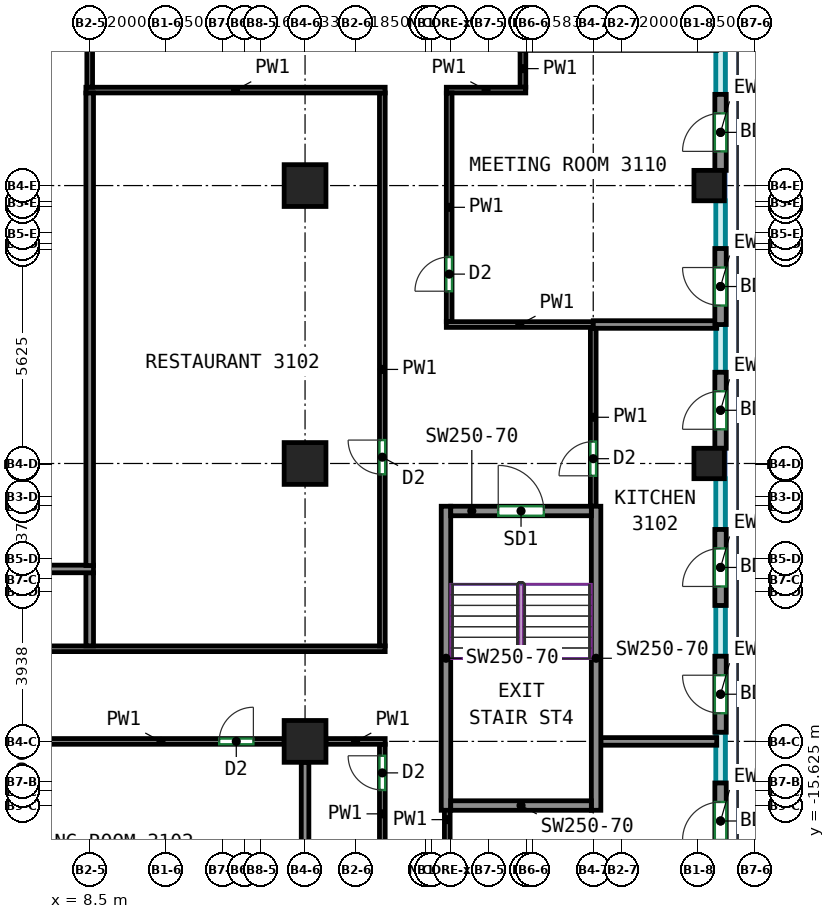
"""IFC4 building model, lengths in metres.
Left out: names, types, materials, properties, quantities, classifications, styles, units other than length and angle.
Written with IfcOpenShell. Run it as: python <this file> out.ifc"""

import sys

from ifc_helpers import new_model, si_unit, direction, frame, frame_2d, origin, origin_2d, place, context, subcontext, project, spatial, rectangle, extrude, source, transform, mapped, element, fill, save


model = new_model("IFC4")
c1 = context("Model", 3, precision=1e-05, world=origin(), true_north=direction((0.0, 1.0)))
c2 = subcontext(c1, "Body", "Model", "MODEL_VIEW")
j1 = project(units=[si_unit("LENGTHUNIT", "METRE"), si_unit("PLANEANGLEUNIT", "RADIAN")], contexts=[c1])
p1 = place(None, origin())
s1 = spatial("IfcSite", under=j1, at=p1, CompositionType="ELEMENT")
p2 = place(p1, origin())
s2 = spatial("IfcBuilding", under=s1, at=p2, CompositionType="ELEMENT")
p3 = place(p2, frame((0.0, 0.0, 138.5)))
s3 = spatial("IfcBuildingStorey", under=s2, at=p3, CompositionType="ELEMENT", Elevation=138.5)
m1 = source(origin(), c2, "Body", "SweptSolid", [
    extrude(rectangle(XDim=1.1, YDim=1.1, at=origin_2d()), origin(), (0.0, 0.0, 1.0), 5.12),
])
for number, where, z_axis, x_axis in (
    (1, (14.167, -13.938, 0.0), (0.0, 0.0, 1.0), (1.0, 0.0, 0.0)),
    (2, (14.167, -6.625, 0.0), (0.0, 0.0, 1.0), (1.0, 0.0, 0.0)),
    (3, (14.167, 0.688, 0.0), (0.0, 0.0, 1.0), (1.0, 0.0, 0.0)),
):
    element("IfcColumn", number, at=place(p3, frame(where, z_axis=z_axis, x_axis=x_axis)), inside=s3, PredefinedType="COLUMN", context=c2, shape_type="MappedRepresentation", body=[
        mapped(m1, transform((0.0, 0.0, 0.0))),
    ])
m2 = source(origin(), c2, "Body", "SweptSolid", [
    extrude(rectangle(XDim=0.8, YDim=0.8, at=origin_2d()), origin(), (0.0, 0.0, 1.0), 5.12),
])
for number, where, z_axis, x_axis in (
    (4, (24.8, -6.625, 0.0), (0.0, 0.0, 1.0), (1.0, 0.0, 0.0)),
    (5, (24.8, 0.688, 0.0), (0.0, 0.0, 1.0), (1.0, 0.0, 0.0)),
):
    element("IfcColumn", number, at=place(p3, frame(where, z_axis=z_axis, x_axis=x_axis)), inside=s3, PredefinedType="COLUMN", context=c2, shape_type="MappedRepresentation", body=[
        mapped(m2, transform((0.0, 0.0, 0.0))),
    ])
m3 = source(origin(), c2, "Body", "SweptSolid", [
    extrude(rectangle(XDim=8.0, YDim=0.25, at=frame_2d((4.0, 0.0))), origin(), (0.0, 0.0, 1.0), 5.12),
])
for number, where, z_axis, x_axis in (
    (6, (17.875, -15.75, 0.0), (0.0, 0.0, 1.0), (0.0, 1.0, 0.0)),
    (7, (21.825, -15.75, 0.0), (0.0, 0.0, 1.0), (0.0, 1.0, 0.0)),
):
    element("IfcWall", number, at=place(p3, frame(where, z_axis=z_axis, x_axis=x_axis)), inside=s3, PredefinedType="SHEAR", context=c2, shape_type="MappedRepresentation", body=[
        mapped(m3, transform((0.0, 0.0, 0.0))),
    ])
m4 = source(origin(), c2, "Body", "SweptSolid", [
    extrude(rectangle(XDim=3.7, YDim=0.25, at=frame_2d((1.85, 0.0))), origin(), (0.0, 0.0, 1.0), 5.12),
])
p4 = place(p3, frame((18.0, -15.625, 0.0), z_axis=(0.0, 0.0, 1.0), x_axis=(1.0, 0.0, 0.0)))
e8 = element("IfcWall", 8, at=p4, inside=s3, PredefinedType="SHEAR", context=c2, shape_type="MappedRepresentation", body=[
    mapped(m4, transform((0.0, 0.0, 0.0))),
])
p5 = place(p3, frame((18.0, -7.875, 0.0), z_axis=(0.0, 0.0, 1.0), x_axis=(1.0, 0.0, 0.0)))
e9 = element("IfcWall", 9, at=p5, inside=s3, PredefinedType="SHEAR", context=c2, shape_type="MappedRepresentation", body=[
    mapped(m4, transform((0.0, 0.0, 0.0))),
])
p6 = place(p5, frame((1.25, 0.0, 0.0)))
e10 = element("IfcOpeningElement", 10, at=p6, cuts=e9, PredefinedType="OPENING", context=c2, shape_type="SweptSolid", body=[
    extrude(rectangle(XDim=1.2, YDim=2.1, at=frame_2d((0.6, 1.05))), frame((0.0, 0.135, 0.0), z_axis=(0.0, -1.0, 0.0), x_axis=(1.0, 0.0, 0.0)), (0.0, 0.0, 1.0), 0.27),
])
m5 = source(origin(), c2, "Body", "SweptSolid", [
    extrude(rectangle(XDim=2.0, YDim=0.3, at=frame_2d((1.0, 0.0))), origin(), (0.0, 0.0, 1.0), 5.12),
])
p7 = place(p3, frame((25.1, -17.032, 0.0), z_axis=(0.0, 0.0, 1.0), x_axis=(0.0, 1.0, 0.0)))
e11 = element("IfcWall", 11, at=p7, inside=s3, PredefinedType="SOLIDWALL", context=c2, shape_type="MappedRepresentation", body=[
    mapped(m5, transform((0.0, 0.0, 0.0))),
])
p8 = place(p7, frame((0.5, 0.0, 0.0)))
e12 = element("IfcOpeningElement", 12, at=p8, cuts=e11, PredefinedType="OPENING", context=c2, shape_type="SweptSolid", body=[
    extrude(rectangle(XDim=1.0, YDim=2.1, at=frame_2d((0.5, 1.05))), frame((0.0, 0.16, 0.0), z_axis=(0.0, -1.0, 0.0), x_axis=(1.0, 0.0, 0.0)), (0.0, 0.0, 1.0), 0.32),
])
p9 = place(p3, frame((25.1, -13.696, 0.0), z_axis=(0.0, 0.0, 1.0), x_axis=(0.0, 1.0, 0.0)))
e13 = element("IfcWall", 13, at=p9, inside=s3, PredefinedType="SOLIDWALL", context=c2, shape_type="MappedRepresentation", body=[
    mapped(m5, transform((0.0, 0.0, 0.0))),
])
p10 = place(p9, frame((0.5, 0.0, 0.0)))
e14 = element("IfcOpeningElement", 14, at=p10, cuts=e13, PredefinedType="OPENING", context=c2, shape_type="SweptSolid", body=[
    extrude(rectangle(XDim=1.0, YDim=2.1, at=frame_2d((0.5, 1.05))), frame((0.0, 0.16, 0.0), z_axis=(0.0, -1.0, 0.0), x_axis=(1.0, 0.0, 0.0)), (0.0, 0.0, 1.0), 0.32),
])
p11 = place(p3, frame((25.1, -10.361, 0.0), z_axis=(0.0, 0.0, 1.0), x_axis=(0.0, 1.0, 0.0)))
e15 = element("IfcWall", 15, at=p11, inside=s3, PredefinedType="SOLIDWALL", context=c2, shape_type="MappedRepresentation", body=[
    mapped(m5, transform((0.0, 0.0, 0.0))),
])
p12 = place(p11, frame((0.5, 0.0, 0.0)))
e16 = element("IfcOpeningElement", 16, at=p12, cuts=e15, PredefinedType="OPENING", context=c2, shape_type="SweptSolid", body=[
    extrude(rectangle(XDim=1.0, YDim=2.1, at=frame_2d((0.5, 1.05))), frame((0.0, 0.16, 0.0), z_axis=(0.0, -1.0, 0.0), x_axis=(1.0, 0.0, 0.0)), (0.0, 0.0, 1.0), 0.32),
])
p13 = place(p3, frame((25.1, -6.225, 0.0), z_axis=(0.0, 0.0, 1.0), x_axis=(0.0, 1.0, 0.0)))
e17 = element("IfcWall", 17, at=p13, inside=s3, PredefinedType="SOLIDWALL", context=c2, shape_type="MappedRepresentation", body=[
    mapped(m5, transform((0.0, 0.0, 0.0))),
])
p14 = place(p13, frame((0.5, 0.0, 0.0)))
e18 = element("IfcOpeningElement", 18, at=p14, cuts=e17, PredefinedType="OPENING", context=c2, shape_type="SweptSolid", body=[
    extrude(rectangle(XDim=1.0, YDim=2.1, at=frame_2d((0.5, 1.05))), frame((0.0, 0.16, 0.0), z_axis=(0.0, -1.0, 0.0), x_axis=(1.0, 0.0, 0.0)), (0.0, 0.0, 1.0), 0.32),
])
p15 = place(p3, frame((25.1, -2.969, 0.0), z_axis=(0.0, 0.0, 1.0), x_axis=(0.0, 1.0, 0.0)))
e19 = element("IfcWall", 19, at=p15, inside=s3, PredefinedType="SOLIDWALL", context=c2, shape_type="MappedRepresentation", body=[
    mapped(m5, transform((0.0, 0.0, 0.0))),
])
p16 = place(p15, frame((0.5, 0.0, 0.0)))
e20 = element("IfcOpeningElement", 20, at=p16, cuts=e19, PredefinedType="OPENING", context=c2, shape_type="SweptSolid", body=[
    extrude(rectangle(XDim=1.0, YDim=2.1, at=frame_2d((0.5, 1.05))), frame((0.0, 0.16, 0.0), z_axis=(0.0, -1.0, 0.0), x_axis=(1.0, 0.0, 0.0)), (0.0, 0.0, 1.0), 0.32),
])
p17 = place(p3, frame((25.1, 1.087, 0.0), z_axis=(0.0, 0.0, 1.0), x_axis=(0.0, 1.0, 0.0)))
e21 = element("IfcWall", 21, at=p17, inside=s3, PredefinedType="SOLIDWALL", context=c2, shape_type="MappedRepresentation", body=[
    mapped(m5, transform((0.0, 0.0, 0.0))),
])
p18 = place(p17, frame((0.5, 0.0, 0.0)))
e22 = element("IfcOpeningElement", 22, at=p18, cuts=e21, PredefinedType="OPENING", context=c2, shape_type="SweptSolid", body=[
    extrude(rectangle(XDim=1.0, YDim=2.1, at=frame_2d((0.5, 1.05))), frame((0.0, 0.16, 0.0), z_axis=(0.0, -1.0, 0.0), x_axis=(1.0, 0.0, 0.0)), (0.0, 0.0, 1.0), 0.32),
])
p19 = place(p3, frame((7.133, -13.938, 0.0), z_axis=(0.0, 0.0, 1.0), x_axis=(1.0, 0.0, 0.0)))
e23 = element("IfcWall", 23, at=p19, inside=s3, PredefinedType="PARTITIONING", context=c2, shape_type="SweptSolid", body=[
    extrude(rectangle(XDim=6.484, YDim=0.15, at=frame_2d((3.242, 0.0))), origin(), (0.0, 0.0, 1.0), 5.12),
])
p20 = place(p19, frame((4.774, 0.0, 0.0)))
e24 = element("IfcOpeningElement", 24, at=p20, cuts=e23, PredefinedType="OPENING", context=c2, shape_type="SweptSolid", body=[
    extrude(rectangle(XDim=0.9, YDim=2.1, at=frame_2d((0.45, 1.05))), frame((0.0, 0.085, 0.0), z_axis=(0.0, -1.0, 0.0), x_axis=(1.0, 0.0, 0.0)), (0.0, 0.0, 1.0), 0.17),
])
p21 = place(p3, frame((16.2, -17.675, 0.0), z_axis=(0.0, 0.0, 1.0), x_axis=(0.0, 1.0, 0.0)))
e25 = element("IfcWall", 25, at=p21, inside=s3, PredefinedType="PARTITIONING", context=c2, shape_type="SweptSolid", body=[
    extrude(rectangle(XDim=3.662, YDim=0.15, at=frame_2d((1.831, 0.0))), origin(), (0.0, 0.0, 1.0), 5.12),
])
p22 = place(p21, frame((2.459, 0.0, 0.0)))
e26 = element("IfcOpeningElement", 26, at=p22, cuts=e25, PredefinedType="OPENING", context=c2, shape_type="SweptSolid", body=[
    extrude(rectangle(XDim=0.9, YDim=2.1, at=frame_2d((0.45, 1.05))), frame((0.0, 0.085, 0.0), z_axis=(0.0, -1.0, 0.0), x_axis=(1.0, 0.0, 0.0)), (0.0, 0.0, 1.0), 0.17),
])
p23 = place(p3, frame((14.717, -13.938, 0.0), z_axis=(0.0, 0.0, 1.0), x_axis=(1.0, 0.0, 0.0)))
e27 = element("IfcWall", 27, at=p23, inside=s3, PredefinedType="PARTITIONING", context=c2, shape_type="SweptSolid", body=[
    extrude(rectangle(XDim=1.558, YDim=0.15, at=frame_2d((0.779, 0.0))), origin(), (0.0, 0.0, 1.0), 5.12),
])
p24 = place(p3, frame((17.909, -17.675, 0.0), z_axis=(0.0, 0.0, 1.0), x_axis=(0.0, 1.0, 0.0)))
e28 = element("IfcWall", 28, at=p24, inside=s3, PredefinedType="PARTITIONING", context=c2, shape_type="SweptSolid", body=[
    extrude(rectangle(XDim=1.975, YDim=0.15, at=frame_2d((0.988, 0.0))), origin(), (0.0, 0.0, 1.0), 5.12),
])
p25 = place(p24, frame((0.2, 0.0, 0.0)))
e29 = element("IfcOpeningElement", 29, at=p25, cuts=e28, PredefinedType="OPENING", context=c2, shape_type="SweptSolid", body=[
    extrude(rectangle(XDim=0.9, YDim=2.1, at=frame_2d((0.45, 1.05))), frame((0.0, 0.085, 0.0), z_axis=(0.0, -1.0, 0.0), x_axis=(1.0, 0.0, 0.0)), (0.0, 0.0, 1.0), 0.17),
])
p26 = place(p3, frame((19.9, 3.275, 0.0), z_axis=(0.0, 0.0, 1.0), x_axis=(0.0, 1.0, 0.0)))
e30 = element("IfcWall", 30, at=p26, inside=s3, PredefinedType="PARTITIONING", context=c2, shape_type="SweptSolid", body=[
    extrude(rectangle(XDim=0.979, YDim=0.15, at=frame_2d((0.49, 0.0))), origin(), (0.0, 0.0, 1.0), 5.12),
])
p27 = place(p3, frame((17.884, 3.2, 0.0), z_axis=(0.0, 0.0, 1.0), x_axis=(1.0, 0.0, 0.0)))
e31 = element("IfcWall", 31, at=p27, inside=s3, PredefinedType="PARTITIONING", context=c2, shape_type="SweptSolid", body=[
    extrude(rectangle(XDim=2.091, YDim=0.15, at=frame_2d((1.045, 0.0))), origin(), (0.0, 0.0, 1.0), 5.12),
])
p28 = place(p3, frame((17.959, -2.894, 0.0), z_axis=(0.0, 0.0, 1.0), x_axis=(0.0, 1.0, 0.0)))
e32 = element("IfcWall", 32, at=p28, inside=s3, PredefinedType="PARTITIONING", context=c2, shape_type="SweptSolid", body=[
    extrude(rectangle(XDim=6.019, YDim=0.15, at=frame_2d((3.01, 0.0))), origin(), (0.0, 0.0, 1.0), 5.12),
])
p29 = place(p28, frame((0.802, 0.0, 0.0)))
e33 = element("IfcOpeningElement", 33, at=p29, cuts=e32, PredefinedType="OPENING", context=c2, shape_type="SweptSolid", body=[
    extrude(rectangle(XDim=0.9, YDim=2.1, at=frame_2d((0.45, 1.05))), frame((0.0, 0.085, 0.0), z_axis=(0.0, -1.0, 0.0), x_axis=(1.0, 0.0, 0.0)), (0.0, 0.0, 1.0), 0.17),
])
p30 = place(p3, frame((21.751, -2.969, 0.0), z_axis=(0.0, 0.0, 1.0), x_axis=(-1.0, 0.0, 0.0)))
e34 = element("IfcWall", 34, at=p30, inside=s3, PredefinedType="PARTITIONING", context=c2, shape_type="SweptSolid", body=[
    extrude(rectangle(XDim=3.867, YDim=0.15, at=frame_2d((1.934, 0.0))), origin(), (0.0, 0.0, 1.0), 5.12),
])
p31 = place(p3, frame((21.75, -7.75, 0.0), z_axis=(0.0, 0.0, 1.0), x_axis=(0.0, 1.0, 0.0)))
e35 = element("IfcWall", 35, at=p31, inside=s3, PredefinedType="PARTITIONING", context=c2, shape_type="SweptSolid", body=[
    extrude(rectangle(XDim=4.682, YDim=0.15, at=frame_2d((2.341, 0.0))), origin(), (0.0, 0.0, 1.0), 5.12),
])
p32 = place(p31, frame((0.801, 0.0, 0.0)))
e36 = element("IfcOpeningElement", 36, at=p32, cuts=e35, PredefinedType="OPENING", context=c2, shape_type="SweptSolid", body=[
    extrude(rectangle(XDim=0.9, YDim=2.1, at=frame_2d((0.45, 1.05))), frame((0.0, 0.085, 0.0), z_axis=(0.0, -1.0, 0.0), x_axis=(1.0, 0.0, 0.0)), (0.0, 0.0, 1.0), 0.17),
])
p33 = place(p3, frame((-12.075, -11.5, 0.0), z_axis=(0.0, 0.0, 1.0), x_axis=(1.0, 0.0, 0.0)))
e37 = element("IfcWall", 37, at=p33, inside=s3, PredefinedType="PARTITIONING", context=c2, shape_type="SweptSolid", body=[
    extrude(rectangle(XDim=28.35, YDim=0.15, at=frame_2d((14.175, 0.0))), origin(), (0.0, 0.0, 1.0), 5.12),
])
p34 = place(p33, frame((0.404, 0.0, 0.0)))
e38 = element("IfcOpeningElement", 38, at=p34, cuts=e37, PredefinedType="OPENING", context=c2, shape_type="SweptSolid", body=[
    extrude(rectangle(XDim=0.9, YDim=2.1, at=frame_2d((0.45, 1.05))), frame((0.0, 0.085, 0.0), z_axis=(0.0, -1.0, 0.0), x_axis=(1.0, 0.0, 0.0)), (0.0, 0.0, 1.0), 0.17),
])
p35 = place(p33, frame((13.176, 0.0, 0.0)))
e39 = element("IfcOpeningElement", 39, at=p35, cuts=e37, PredefinedType="OPENING", context=c2, shape_type="SweptSolid", body=[
    extrude(rectangle(XDim=1.0, YDim=2.1, at=frame_2d((0.5, 1.05))), frame((0.0, 0.085, 0.0), z_axis=(0.0, -1.0, 0.0), x_axis=(1.0, 0.0, 0.0)), (0.0, 0.0, 1.0), 0.17),
])
p36 = place(p3, frame((16.2, -11.425, 0.0), z_axis=(0.0, 0.0, 1.0), x_axis=(0.0, 1.0, 0.0)))
e40 = element("IfcWall", 40, at=p36, inside=s3, PredefinedType="PARTITIONING", context=c2, shape_type="SweptSolid", body=[
    extrude(rectangle(XDim=14.55, YDim=0.15, at=frame_2d((7.275, 0.0))), origin(), (0.0, 0.0, 1.0), 5.12),
])
p37 = place(p36, frame((4.516, 0.0, 0.0)))
e41 = element("IfcOpeningElement", 41, at=p37, cuts=e40, PredefinedType="OPENING", context=c2, shape_type="SweptSolid", body=[
    extrude(rectangle(XDim=0.9, YDim=2.1, at=frame_2d((0.45, 1.05))), frame((0.0, 0.085, 0.0), z_axis=(0.0, -1.0, 0.0), x_axis=(1.0, 0.0, 0.0)), (0.0, 0.0, 1.0), 0.17),
])
p38 = place(p3, frame((8.4, 3.2, 0.0), z_axis=(0.0, 0.0, 1.0), x_axis=(1.0, 0.0, 0.0)))
e42 = element("IfcWall", 42, at=p38, inside=s3, PredefinedType="PARTITIONING", context=c2, shape_type="SweptSolid", body=[
    extrude(rectangle(XDim=7.875, YDim=0.15, at=frame_2d((3.938, 0.0))), origin(), (0.0, 0.0, 1.0), 5.12),
])
p39 = place(p3, frame((8.5, 5.525, 0.0), z_axis=(0.0, 0.0, 1.0), x_axis=(0.0, -1.0, 0.0)))
e43 = element("IfcWall", 43, at=p39, inside=s3, PredefinedType="PARTITIONING", context=c2, shape_type="SweptSolid", body=[
    extrude(rectangle(XDim=2.25, YDim=0.15, at=frame_2d((1.125, 0.0))), origin(), (0.0, 0.0, 1.0), 5.12),
])
p40 = place(p3, frame((14.167, -20.4, 0.0), z_axis=(0.0, 0.0, 1.0), x_axis=(0.0, 1.0, 0.0)))
e44 = element("IfcWall", 44, at=p40, inside=s3, PredefinedType="PARTITIONING", context=c2, shape_type="SweptSolid", body=[
    extrude(rectangle(XDim=5.912, YDim=0.2, at=frame_2d((2.956, 0.0))), origin(), (0.0, 0.0, 1.0), 5.12),
])
p41 = place(p3, frame((25.0, -13.938, 0.0), z_axis=(0.0, 0.0, 1.0), x_axis=(-1.0, 0.0, 0.0)))
e45 = element("IfcWall", 45, at=p41, inside=s3, PredefinedType="PARTITIONING", context=c2, shape_type="SweptSolid", body=[
    extrude(rectangle(XDim=3.05, YDim=0.2, at=frame_2d((1.525, 0.0))), origin(), (0.0, 0.0, 1.0), 5.12),
])
p42 = place(p3, frame((21.751, -2.968, 0.0), z_axis=(0.0, 0.0, 1.0), x_axis=(0.999999954829, -0.000300571071, 0.0)))
e46 = element("IfcWall", 46, at=p42, inside=s3, PredefinedType="PARTITIONING", context=c2, shape_type="SweptSolid", body=[
    extrude(rectangle(XDim=3.249, YDim=0.2, at=frame_2d((1.625, 0.0))), origin(), (0.0, 0.0, 1.0), 5.12),
])
p43 = place(p3, frame((8.5, -11.423, 0.0), z_axis=(0.0, 0.0, 1.0), x_axis=(0.0, 1.0, 0.0)))
e47 = element("IfcWall", 47, at=p43, inside=s3, PredefinedType="PARTITIONING", context=c2, shape_type="SweptSolid", body=[
    extrude(rectangle(XDim=1.923, YDim=0.2, at=frame_2d((0.961, 0.0))), origin(), (0.0, 0.0, 1.0), 5.12),
])
p44 = place(p3, frame((8.6, -9.4, 0.0), z_axis=(0.0, 0.0, 1.0), x_axis=(-1.0, 0.0, 0.0)))
e48 = element("IfcWall", 48, at=p44, inside=s3, PredefinedType="PARTITIONING", context=c2, shape_type="SweptSolid", body=[
    extrude(rectangle(XDim=15.2, YDim=0.2, at=frame_2d((7.6, 0.0))), origin(), (0.0, 0.0, 1.0), 5.12),
])
p45 = place(p3, frame((8.5, -9.31, 0.0), z_axis=(0.0, 0.0, 1.0), x_axis=(0.0, 1.0, 0.0)))
e49 = element("IfcWall", 49, at=p45, inside=s3, PredefinedType="PARTITIONING", context=c2, shape_type="SweptSolid", body=[
    extrude(rectangle(XDim=12.433, YDim=0.2, at=frame_2d((6.217, 0.0))), origin(), (0.0, 0.0, 1.0), 5.12),
])
p46 = place(p8, origin())
e50 = element("IfcDoor", 50, at=p46, inside=s3, OperationType="SINGLE_SWING_LEFT", PredefinedType="DOOR", context=c2, shape_type="SweptSolid", body=[
    extrude(rectangle(XDim=1.0, YDim=2.1, at=frame_2d((0.5, 1.05))), frame((0.0, 0.025, 0.0), z_axis=(0.0, -1.0, 0.0), x_axis=(1.0, 0.0, 0.0)), (0.0, 0.0, 1.0), 0.05),
])
fill(e12, e50)
p47 = place(p10, origin())
e51 = element("IfcDoor", 51, at=p47, inside=s3, OperationType="SINGLE_SWING_RIGHT", PredefinedType="DOOR", context=c2, shape_type="SweptSolid", body=[
    extrude(rectangle(XDim=1.0, YDim=2.1, at=frame_2d((0.5, 1.05))), frame((0.0, 0.025, 0.0), z_axis=(0.0, -1.0, 0.0), x_axis=(1.0, 0.0, 0.0)), (0.0, 0.0, 1.0), 0.05),
])
fill(e14, e51)
p48 = place(p12, origin())
e52 = element("IfcDoor", 52, at=p48, inside=s3, OperationType="SINGLE_SWING_LEFT", PredefinedType="DOOR", context=c2, shape_type="SweptSolid", body=[
    extrude(rectangle(XDim=1.0, YDim=2.1, at=frame_2d((0.5, 1.05))), frame((0.0, 0.025, 0.0), z_axis=(0.0, -1.0, 0.0), x_axis=(1.0, 0.0, 0.0)), (0.0, 0.0, 1.0), 0.05),
])
fill(e16, e52)
p49 = place(p14, origin())
e53 = element("IfcDoor", 53, at=p49, inside=s3, OperationType="SINGLE_SWING_LEFT", PredefinedType="DOOR", context=c2, shape_type="SweptSolid", body=[
    extrude(rectangle(XDim=1.0, YDim=2.1, at=frame_2d((0.5, 1.05))), frame((0.0, 0.025, 0.0), z_axis=(0.0, -1.0, 0.0), x_axis=(1.0, 0.0, 0.0)), (0.0, 0.0, 1.0), 0.05),
])
fill(e18, e53)
p50 = place(p16, origin())
e54 = element("IfcDoor", 54, at=p50, inside=s3, OperationType="SINGLE_SWING_RIGHT", PredefinedType="DOOR", context=c2, shape_type="SweptSolid", body=[
    extrude(rectangle(XDim=1.0, YDim=2.1, at=frame_2d((0.5, 1.05))), frame((0.0, 0.025, 0.0), z_axis=(0.0, -1.0, 0.0), x_axis=(1.0, 0.0, 0.0)), (0.0, 0.0, 1.0), 0.05),
])
fill(e20, e54)
p51 = place(p18, origin())
e55 = element("IfcDoor", 55, at=p51, inside=s3, OperationType="SINGLE_SWING_LEFT", PredefinedType="DOOR", context=c2, shape_type="SweptSolid", body=[
    extrude(rectangle(XDim=1.0, YDim=2.1, at=frame_2d((0.5, 1.05))), frame((0.0, 0.025, 0.0), z_axis=(0.0, -1.0, 0.0), x_axis=(1.0, 0.0, 0.0)), (0.0, 0.0, 1.0), 0.05),
])
fill(e22, e55)
p52 = place(p6, origin())
e56 = element("IfcDoor", 56, at=p52, inside=s3, OperationType="DOUBLE_DOOR_SINGLE_SWING", PredefinedType="DOOR", context=c2, shape_type="SweptSolid", body=[
    extrude(rectangle(XDim=1.2, YDim=2.1, at=frame_2d((0.6, 1.05))), frame((0.0, 0.025, 0.0), z_axis=(0.0, -1.0, 0.0), x_axis=(1.0, 0.0, 0.0)), (0.0, 0.0, 1.0), 0.05),
])
fill(e10, e56)
p53 = place(p22, origin())
e57 = element("IfcDoor", 57, at=p53, inside=s3, OperationType="SINGLE_SWING_RIGHT", PredefinedType="DOOR", context=c2, shape_type="SweptSolid", body=[
    extrude(rectangle(XDim=0.9, YDim=2.1, at=frame_2d((0.45, 1.05))), frame((0.0, 0.025, 0.0), z_axis=(0.0, -1.0, 0.0), x_axis=(1.0, 0.0, 0.0)), (0.0, 0.0, 1.0), 0.05),
])
fill(e26, e57)
p54 = place(p20, origin())
e58 = element("IfcDoor", 58, at=p54, inside=s3, OperationType="SINGLE_SWING_RIGHT", PredefinedType="DOOR", context=c2, shape_type="SweptSolid", body=[
    extrude(rectangle(XDim=0.9, YDim=2.1, at=frame_2d((0.45, 1.05))), frame((0.0, 0.025, 0.0), z_axis=(0.0, -1.0, 0.0), x_axis=(1.0, 0.0, 0.0)), (0.0, 0.0, 1.0), 0.05),
])
fill(e24, e58)
p55 = place(p32, origin())
e59 = element("IfcDoor", 59, at=p55, inside=s3, OperationType="SINGLE_SWING_LEFT", PredefinedType="DOOR", context=c2, shape_type="SweptSolid", body=[
    extrude(rectangle(XDim=0.9, YDim=2.1, at=frame_2d((0.45, 1.05))), frame((0.0, 0.025, 0.0), z_axis=(0.0, -1.0, 0.0), x_axis=(1.0, 0.0, 0.0)), (0.0, 0.0, 1.0), 0.05),
])
fill(e36, e59)
p56 = place(p37, origin())
e60 = element("IfcDoor", 60, at=p56, inside=s3, OperationType="SINGLE_SWING_RIGHT", PredefinedType="DOOR", context=c2, shape_type="SweptSolid", body=[
    extrude(rectangle(XDim=0.9, YDim=2.1, at=frame_2d((0.45, 1.05))), frame((0.0, 0.025, 0.0), z_axis=(0.0, -1.0, 0.0), x_axis=(1.0, 0.0, 0.0)), (0.0, 0.0, 1.0), 0.05),
])
fill(e41, e60)
p57 = place(p29, origin())
e61 = element("IfcDoor", 61, at=p57, inside=s3, OperationType="SINGLE_SWING_LEFT", PredefinedType="DOOR", context=c2, shape_type="SweptSolid", body=[
    extrude(rectangle(XDim=0.9, YDim=2.1, at=frame_2d((0.45, 1.05))), frame((0.0, 0.025, 0.0), z_axis=(0.0, -1.0, 0.0), x_axis=(1.0, 0.0, 0.0)), (0.0, 0.0, 1.0), 0.05),
])
fill(e33, e61)
save(model, sys.argv[1])
